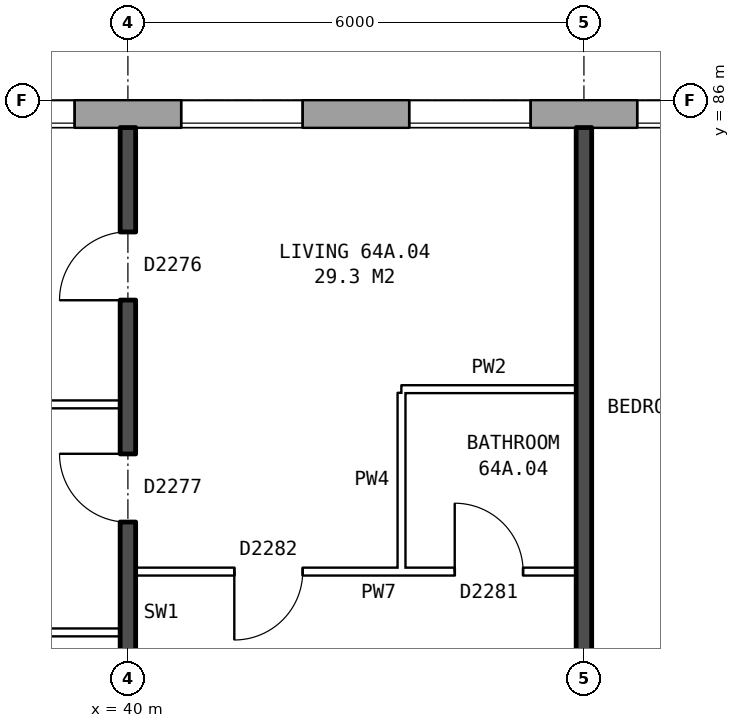
"""IFC4 building model, lengths in metres.
Left out: names, types, materials, properties, quantities, classifications, styles, units other than length and angle.
Written with IfcOpenShell. Run it as: python <this file> out.ifc"""

import sys

from ifc_helpers import new_model, si_unit, direction, frame, frame_2d, origin, place, context, subcontext, project, spatial, rectangle, extrude, element, fill, save


model = new_model("IFC4")
c1 = context("Model", 3, precision=1e-05, world=origin(), true_north=direction((0.0, 1.0)))
c2 = subcontext(c1, "Body", "Model", "MODEL_VIEW")
j1 = project(units=[si_unit("LENGTHUNIT", "METRE"), si_unit("PLANEANGLEUNIT", "RADIAN")], contexts=[c1])
p1 = place(None, origin())
s1 = spatial("IfcSite", under=j1, at=p1, CompositionType="ELEMENT")
p2 = place(p1, origin())
s2 = spatial("IfcBuilding", under=s1, at=p2, CompositionType="ELEMENT")
p3 = place(p2, frame((0.0, 0.0, 227.6)))
s3 = spatial("IfcBuildingStorey", under=s2, at=p3, CompositionType="ELEMENT", Elevation=227.6)
p4 = place(p3, frame((74.95, 85.82, 0.0), z_axis=(0.0, 0.0, 1.0), x_axis=(-1.0, 0.0, 0.0)))
e1 = element("IfcWall", 1, at=p4, inside=s3, PredefinedType="STANDARD", context=c2, shape_type="SweptSolid", body=[
    extrude(rectangle(XDim=39.875, YDim=0.36, at=frame_2d((19.938, 0.0))), origin(), (0.0, 0.0, 1.0), 2.85),
])
p5 = place(p4, frame((2.65, 0.0, 0.8)))
e2 = element("IfcOpeningElement", 2, at=p5, cuts=e1, PredefinedType="OPENING", context=c2, shape_type="SweptSolid", body=[
    extrude(rectangle(XDim=1.6, YDim=1.8, at=frame_2d((0.8, 0.9))), frame((0.0, 0.19, 0.0), z_axis=(0.0, -1.0, 0.0), x_axis=(1.0, 0.0, 0.0)), (0.0, 0.0, 1.0), 0.38),
])
p6 = place(p4, frame((5.65, 0.0, 0.8)))
e3 = element("IfcOpeningElement", 3, at=p6, cuts=e1, PredefinedType="OPENING", context=c2, shape_type="SweptSolid", body=[
    extrude(rectangle(XDim=1.6, YDim=1.8, at=frame_2d((0.8, 0.9))), frame((0.0, 0.19, 0.0), z_axis=(0.0, -1.0, 0.0), x_axis=(1.0, 0.0, 0.0)), (0.0, 0.0, 1.0), 0.38),
])
p7 = place(p4, frame((8.65, 0.0, 0.8)))
e4 = element("IfcOpeningElement", 4, at=p7, cuts=e1, PredefinedType="OPENING", context=c2, shape_type="SweptSolid", body=[
    extrude(rectangle(XDim=1.6, YDim=1.8, at=frame_2d((0.8, 0.9))), frame((0.0, 0.19, 0.0), z_axis=(0.0, -1.0, 0.0), x_axis=(1.0, 0.0, 0.0)), (0.0, 0.0, 1.0), 0.38),
])
p8 = place(p4, frame((11.65, 0.0, 0.8)))
e5 = element("IfcOpeningElement", 5, at=p8, cuts=e1, PredefinedType="OPENING", context=c2, shape_type="SweptSolid", body=[
    extrude(rectangle(XDim=1.6, YDim=1.8, at=frame_2d((0.8, 0.9))), frame((0.0, 0.19, 0.0), z_axis=(0.0, -1.0, 0.0), x_axis=(1.0, 0.0, 0.0)), (0.0, 0.0, 1.0), 0.38),
])
p9 = place(p4, frame((14.1, 0.0, 0.8)))
e6 = element("IfcOpeningElement", 6, at=p9, cuts=e1, PredefinedType="OPENING", context=c2, shape_type="SweptSolid", body=[
    extrude(rectangle(XDim=0.8, YDim=1.8, at=frame_2d((0.4, 0.9))), frame((0.0, 0.19, 0.0), z_axis=(0.0, -1.0, 0.0), x_axis=(1.0, 0.0, 0.0)), (0.0, 0.0, 1.0), 0.38),
])
p10 = place(p4, frame((17.65, 0.0, 0.8)))
e7 = element("IfcOpeningElement", 7, at=p10, cuts=e1, PredefinedType="OPENING", context=c2, shape_type="SweptSolid", body=[
    extrude(rectangle(XDim=1.6, YDim=1.8, at=frame_2d((0.8, 0.9))), frame((0.0, 0.19, 0.0), z_axis=(0.0, -1.0, 0.0), x_axis=(1.0, 0.0, 0.0)), (0.0, 0.0, 1.0), 0.38),
])
p11 = place(p4, frame((20.65, 0.0, 0.8)))
e8 = element("IfcOpeningElement", 8, at=p11, cuts=e1, PredefinedType="OPENING", context=c2, shape_type="SweptSolid", body=[
    extrude(rectangle(XDim=1.6, YDim=1.8, at=frame_2d((0.8, 0.9))), frame((0.0, 0.19, 0.0), z_axis=(0.0, -1.0, 0.0), x_axis=(1.0, 0.0, 0.0)), (0.0, 0.0, 1.0), 0.38),
])
p12 = place(p4, frame((23.15, 0.0, 0.75)))
e9 = element("IfcOpeningElement", 9, at=p12, cuts=e1, PredefinedType="OPENING", context=c2, shape_type="SweptSolid", body=[
    extrude(rectangle(XDim=1.2, YDim=1.8, at=frame_2d((0.6, 0.9))), frame((0.0, 0.19, 0.0), z_axis=(0.0, -1.0, 0.0), x_axis=(1.0, 0.0, 0.0)), (0.0, 0.0, 1.0), 0.38),
])
p13 = place(p4, frame((26.65, 0.0, 0.8)))
e10 = element("IfcOpeningElement", 10, at=p13, cuts=e1, PredefinedType="OPENING", context=c2, shape_type="SweptSolid", body=[
    extrude(rectangle(XDim=1.6, YDim=1.8, at=frame_2d((0.8, 0.9))), frame((0.0, 0.19, 0.0), z_axis=(0.0, -1.0, 0.0), x_axis=(1.0, 0.0, 0.0)), (0.0, 0.0, 1.0), 0.38),
])
p14 = place(p4, frame((29.65, 0.0, 0.8)))
e11 = element("IfcOpeningElement", 11, at=p14, cuts=e1, PredefinedType="OPENING", context=c2, shape_type="SweptSolid", body=[
    extrude(rectangle(XDim=1.6, YDim=1.8, at=frame_2d((0.8, 0.9))), frame((0.0, 0.19, 0.0), z_axis=(0.0, -1.0, 0.0), x_axis=(1.0, 0.0, 0.0)), (0.0, 0.0, 1.0), 0.38),
])
p15 = place(p4, frame((32.65, 0.0, 0.8)))
e12 = element("IfcOpeningElement", 12, at=p15, cuts=e1, PredefinedType="OPENING", context=c2, shape_type="SweptSolid", body=[
    extrude(rectangle(XDim=1.6, YDim=1.8, at=frame_2d((0.8, 0.9))), frame((0.0, 0.19, 0.0), z_axis=(0.0, -1.0, 0.0), x_axis=(1.0, 0.0, 0.0)), (0.0, 0.0, 1.0), 0.38),
])
p16 = place(p4, frame((35.65, 0.0, 0.8)))
e13 = element("IfcOpeningElement", 13, at=p16, cuts=e1, PredefinedType="OPENING", context=c2, shape_type="SweptSolid", body=[
    extrude(rectangle(XDim=1.6, YDim=1.8, at=frame_2d((0.8, 0.9))), frame((0.0, 0.19, 0.0), z_axis=(0.0, -1.0, 0.0), x_axis=(1.0, 0.0, 0.0)), (0.0, 0.0, 1.0), 0.38),
])
p17 = place(p4, frame((15.2, 0.0, 1.7)))
e14 = element("IfcOpeningElement", 14, at=p17, cuts=e1, PredefinedType="OPENING", context=c2, shape_type="SweptSolid", body=[
    extrude(rectangle(XDim=0.6, YDim=0.9, at=frame_2d((0.3, 0.45))), frame((0.0, 0.19, 0.0), z_axis=(0.0, -1.0, 0.0), x_axis=(1.0, 0.0, 0.0)), (0.0, 0.0, 1.0), 0.38),
])
p18 = place(p4, frame((24.65, 0.0, 0.35)))
e15 = element("IfcOpeningElement", 15, at=p18, cuts=e1, PredefinedType="OPENING", context=c2, shape_type="SweptSolid", body=[
    extrude(rectangle(XDim=0.6, YDim=0.9, at=frame_2d((0.3, 0.45))), frame((0.0, 0.19, 0.0), z_axis=(0.0, -1.0, 0.0), x_axis=(1.0, 0.0, 0.0)), (0.0, 0.0, 1.0), 0.38),
])
p19 = place(p3, frame((32.36, 79.0, 0.0), z_axis=(0.0, 0.0, 1.0), x_axis=(1.0, 0.0, 0.0)))
e16 = element("IfcWall", 16, at=p19, inside=s3, PredefinedType="PARTITIONING", context=c2, shape_type="SweptSolid", body=[
    extrude(rectangle(XDim=7.54, YDim=0.1, at=frame_2d((3.77, 0.0))), origin(), (0.0, 0.0, 1.0), 2.85),
])
p20 = place(p3, frame((40.1, 79.8, 0.0), z_axis=(0.0, 0.0, 1.0), x_axis=(1.0, 0.0, 0.0)))
e17 = element("IfcWall", 17, at=p20, inside=s3, PredefinedType="PARTITIONING", context=c2, shape_type="SweptSolid", body=[
    extrude(rectangle(XDim=5.8, YDim=0.1, at=frame_2d((2.9, 0.0))), origin(), (0.0, 0.0, 1.0), 2.85),
])
p21 = place(p20, frame((1.3, 0.0, 0.0)))
e18 = element("IfcOpeningElement", 18, at=p21, cuts=e17, PredefinedType="OPENING", context=c2, shape_type="SweptSolid", body=[
    extrude(rectangle(XDim=0.9, YDim=2.1, at=frame_2d((0.45, 1.05))), frame((0.0, 0.06, 0.0), z_axis=(0.0, -1.0, 0.0), x_axis=(1.0, 0.0, 0.0)), (0.0, 0.0, 1.0), 0.12),
])
p22 = place(p20, frame((4.2, 0.0, 0.0)))
e19 = element("IfcOpeningElement", 19, at=p22, cuts=e17, PredefinedType="OPENING", context=c2, shape_type="SweptSolid", body=[
    extrude(rectangle(XDim=0.9, YDim=2.1, at=frame_2d((0.45, 1.05))), frame((0.0, 0.06, 0.0), z_axis=(0.0, -1.0, 0.0), x_axis=(1.0, 0.0, 0.0)), (0.0, 0.0, 1.0), 0.12),
])
p23 = place(p3, frame((32.36, 82.0, 0.0), z_axis=(0.0, 0.0, 1.0), x_axis=(1.0, 0.0, 0.0)))
e20 = element("IfcWall", 20, at=p23, inside=s3, PredefinedType="PARTITIONING", context=c2, shape_type="SweptSolid", body=[
    extrude(rectangle(XDim=7.54, YDim=0.1, at=frame_2d((3.77, 0.0))), origin(), (0.0, 0.0, 1.0), 2.85),
])
p24 = place(p3, frame((43.6, 82.2, 0.0), z_axis=(0.0, 0.0, 1.0), x_axis=(1.0, 0.0, 0.0)))
e21 = element("IfcWall", 21, at=p24, inside=s3, PredefinedType="PARTITIONING", context=c2, shape_type="SweptSolid", body=[
    extrude(rectangle(XDim=2.3, YDim=0.1, at=frame_2d((1.15, 0.0))), origin(), (0.0, 0.0, 1.0), 2.85),
])
p25 = place(p3, frame((40.0, 76.2, 0.0), z_axis=(0.0, 0.0, 1.0), x_axis=(0.0, 1.0, 0.0)))
e22 = element("IfcWall", 22, at=p25, inside=s3, PredefinedType="SOLIDWALL", context=c2, shape_type="SweptSolid", body=[
    extrude(rectangle(XDim=9.44, YDim=0.2, at=frame_2d((4.72, 0.0))), origin(), (0.0, 0.0, 1.0), 2.85),
])
p26 = place(p25, frame((7.17, 0.0, 0.0)))
e23 = element("IfcOpeningElement", 23, at=p26, cuts=e22, PredefinedType="OPENING", context=c2, shape_type="SweptSolid", body=[
    extrude(rectangle(XDim=0.9, YDim=2.1, at=frame_2d((0.45, 1.05))), frame((0.0, 0.11, 0.0), z_axis=(0.0, -1.0, 0.0), x_axis=(1.0, 0.0, 0.0)), (0.0, 0.0, 1.0), 0.22),
])
p27 = place(p25, frame((4.25, 0.0, 0.0)))
e24 = element("IfcOpeningElement", 24, at=p27, cuts=e22, PredefinedType="OPENING", context=c2, shape_type="SweptSolid", body=[
    extrude(rectangle(XDim=0.9, YDim=2.1, at=frame_2d((0.45, 1.05))), frame((0.0, 0.11, 0.0), z_axis=(0.0, -1.0, 0.0), x_axis=(1.0, 0.0, 0.0)), (0.0, 0.0, 1.0), 0.22),
])
p28 = place(p25, frame((0.95, 0.0, 0.0)))
e25 = element("IfcOpeningElement", 25, at=p28, cuts=e22, PredefinedType="OPENING", context=c2, shape_type="SweptSolid", body=[
    extrude(rectangle(XDim=0.9, YDim=2.1, at=frame_2d((0.45, 1.05))), frame((0.0, 0.11, 0.0), z_axis=(0.0, -1.0, 0.0), x_axis=(1.0, 0.0, 0.0)), (0.0, 0.0, 1.0), 0.22),
])
p29 = place(p3, frame((43.6, 79.85, 0.0), z_axis=(0.0, 0.0, 1.0), x_axis=(0.0, 1.0, 0.0)))
e26 = element("IfcWall", 26, at=p29, inside=s3, PredefinedType="PARTITIONING", context=c2, shape_type="SweptSolid", body=[
    extrude(rectangle(XDim=2.3, YDim=0.1, at=frame_2d((1.15, 0.0))), origin(), (0.0, 0.0, 1.0), 2.85),
])
p30 = place(p3, frame((46.0, 71.2, 0.0), z_axis=(0.0, 0.0, 1.0), x_axis=(0.0, 1.0, 0.0)))
e27 = element("IfcWall", 27, at=p30, inside=s3, PredefinedType="SOLIDWALL", context=c2, shape_type="SweptSolid", body=[
    extrude(rectangle(XDim=14.44, YDim=0.2, at=frame_2d((7.22, 0.0))), origin(), (0.0, 0.0, 1.0), 2.85),
])
p31 = place(p13, origin())
e28 = element("IfcWindow", 28, at=p31, inside=s3, PartitioningType="SINGLE_PANEL", PredefinedType="WINDOW", context=c2, shape_type="SweptSolid", body=[
    extrude(rectangle(XDim=1.6, YDim=1.8, at=frame_2d((0.8, 0.9))), frame((0.0, 0.15, 0.0), z_axis=(0.0, -1.0, 0.0), x_axis=(1.0, 0.0, 0.0)), (0.0, 0.0, 1.0), 0.06),
])
fill(e10, e28)
p32 = place(p14, origin())
e29 = element("IfcWindow", 29, at=p32, inside=s3, PartitioningType="SINGLE_PANEL", PredefinedType="WINDOW", context=c2, shape_type="SweptSolid", body=[
    extrude(rectangle(XDim=1.6, YDim=1.8, at=frame_2d((0.8, 0.9))), frame((0.0, 0.15, 0.0), z_axis=(0.0, -1.0, 0.0), x_axis=(1.0, 0.0, 0.0)), (0.0, 0.0, 1.0), 0.06),
])
fill(e11, e29)
p33 = place(p15, origin())
e30 = element("IfcWindow", 30, at=p33, inside=s3, PartitioningType="SINGLE_PANEL", PredefinedType="WINDOW", context=c2, shape_type="SweptSolid", body=[
    extrude(rectangle(XDim=1.6, YDim=1.8, at=frame_2d((0.8, 0.9))), frame((0.0, 0.15, 0.0), z_axis=(0.0, -1.0, 0.0), x_axis=(1.0, 0.0, 0.0)), (0.0, 0.0, 1.0), 0.06),
])
fill(e12, e30)
p34 = place(p16, origin())
e31 = element("IfcWindow", 31, at=p34, inside=s3, PartitioningType="SINGLE_PANEL", PredefinedType="WINDOW", context=c2, shape_type="SweptSolid", body=[
    extrude(rectangle(XDim=1.6, YDim=1.8, at=frame_2d((0.8, 0.9))), frame((0.0, 0.15, 0.0), z_axis=(0.0, -1.0, 0.0), x_axis=(1.0, 0.0, 0.0)), (0.0, 0.0, 1.0), 0.06),
])
fill(e13, e31)
p35 = place(p26, origin())
e32 = element("IfcDoor", 32, at=p35, inside=s3, OperationType="SINGLE_SWING_LEFT", PredefinedType="DOOR", context=c2, shape_type="SweptSolid", body=[
    extrude(rectangle(XDim=0.9, YDim=2.1, at=frame_2d((0.45, 1.05))), frame((0.0, 0.025, 0.0), z_axis=(0.0, -1.0, 0.0), x_axis=(1.0, 0.0, 0.0)), (0.0, 0.0, 1.0), 0.05),
])
fill(e23, e32)
p36 = place(p27, origin())
e33 = element("IfcDoor", 33, at=p36, inside=s3, OperationType="SINGLE_SWING_RIGHT", PredefinedType="DOOR", context=c2, shape_type="SweptSolid", body=[
    extrude(rectangle(XDim=0.9, YDim=2.1, at=frame_2d((0.45, 1.05))), frame((0.0, 0.025, 0.0), z_axis=(0.0, -1.0, 0.0), x_axis=(1.0, 0.0, 0.0)), (0.0, 0.0, 1.0), 0.05),
])
fill(e24, e33)
p37 = place(p21, frame((0.9, 0.0, 0.0), z_axis=(0.0, 0.0, 1.0), x_axis=(-1.0, 0.0, 0.0)))
e34 = element("IfcDoor", 34, at=p37, inside=s3, OperationType="SINGLE_SWING_RIGHT", PredefinedType="DOOR", context=c2, shape_type="SweptSolid", body=[
    extrude(rectangle(XDim=0.9, YDim=2.1, at=frame_2d((0.45, 1.05))), frame((0.0, 0.025, 0.0), z_axis=(0.0, -1.0, 0.0), x_axis=(1.0, 0.0, 0.0)), (0.0, 0.0, 1.0), 0.05),
])
fill(e18, e34)
p38 = place(p22, origin())
e35 = element("IfcDoor", 35, at=p38, inside=s3, OperationType="SINGLE_SWING_LEFT", PredefinedType="DOOR", context=c2, shape_type="SweptSolid", body=[
    extrude(rectangle(XDim=0.9, YDim=2.1, at=frame_2d((0.45, 1.05))), frame((0.0, 0.025, 0.0), z_axis=(0.0, -1.0, 0.0), x_axis=(1.0, 0.0, 0.0)), (0.0, 0.0, 1.0), 0.05),
])
fill(e19, e35)
save(model, sys.argv[1])
